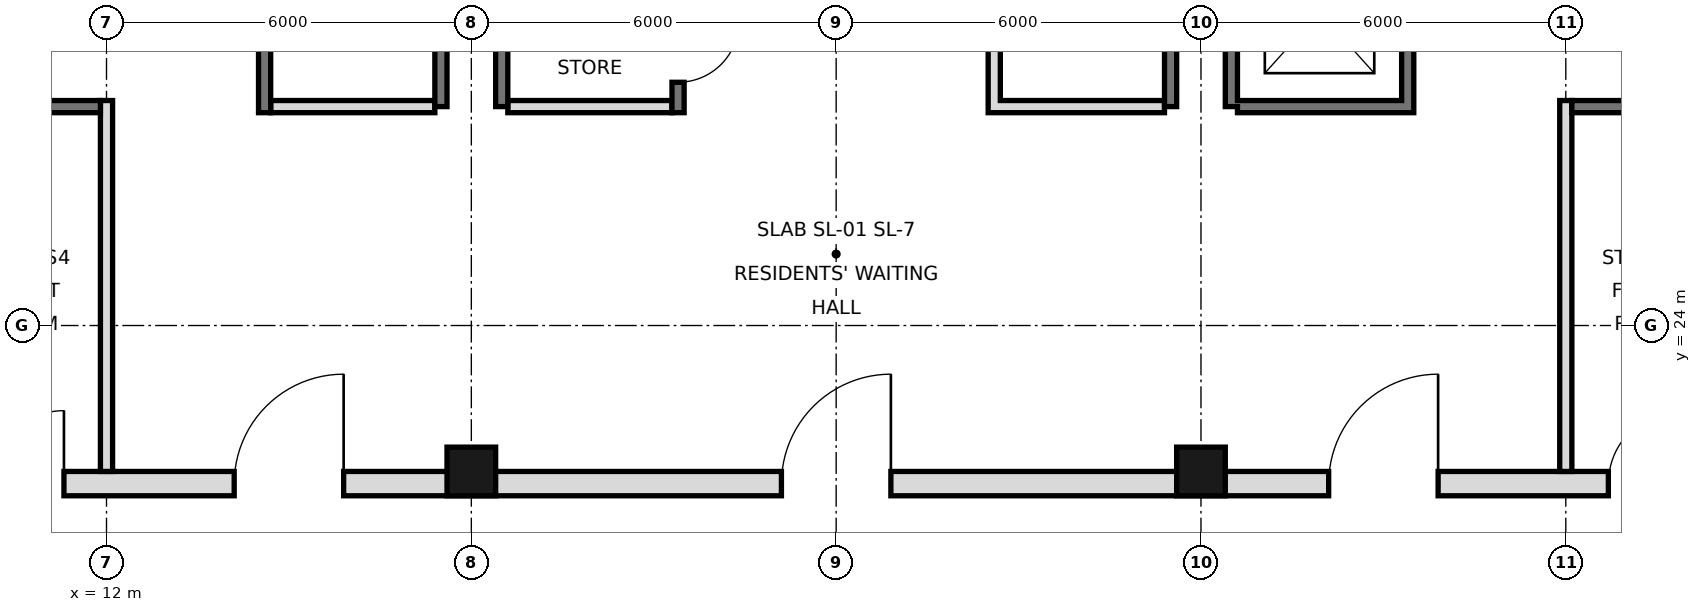
"""IFC4 building model, lengths in metres.
Left out: names, types, materials, properties, quantities, classifications, styles, units other than length and angle.
Written with IfcOpenShell. Run it as: python <this file> out.ifc"""

import sys

from ifc_helpers import new_model, si_unit, direction, frame, frame_2d, origin, origin_2d, place, context, subcontext, project, spatial, rectangle, hollow_rectangle, extrude, element, fill, save


model = new_model("IFC4")
c1 = context("Model", 3, precision=1e-05, world=origin(), true_north=direction((0.0, 1.0)))
c2 = subcontext(c1, "Body", "Model", "MODEL_VIEW")
j1 = project(units=[si_unit("LENGTHUNIT", "METRE"), si_unit("PLANEANGLEUNIT", "RADIAN")], contexts=[c1])
p1 = place(None, origin())
s1 = spatial("IfcSite", under=j1, at=p1, CompositionType="ELEMENT")
p2 = place(p1, origin())
s2 = spatial("IfcBuilding", under=s1, at=p2, CompositionType="ELEMENT")
p3 = place(p2, frame((0.0, 0.0, 254.0)))
s3 = spatial("IfcBuildingStorey", under=s2, at=p3, CompositionType="ELEMENT", Elevation=254.0)
for number, where, z_axis, x_axis in (
    (1, (18.0, 21.6, 0.0), (0.0, 0.0, 1.0), (1.0, 0.0, 0.0)),
    (2, (30.0, 21.6, 0.0), (0.0, 0.0, 1.0), (1.0, 0.0, 0.0)),
):
    element("IfcColumn", number, at=place(p3, frame(where, z_axis=z_axis, x_axis=x_axis)), inside=s3, PredefinedType="COLUMN", context=c2, shape_type="SweptSolid", body=[
        extrude(hollow_rectangle(XDim=0.8, YDim=0.8, WallThickness=0.032, at=origin_2d()), origin(), (0.0, 0.0, 1.0), 3.6),
    ])
for number, where, z_axis, x_axis in (
    (3, (17.5, 27.6, 0.0), (0.0, 0.0, 1.0), (0.0, 1.0, 0.0)),
    (4, (18.5, 27.6, 0.0), (0.0, 0.0, 1.0), (0.0, 1.0, 0.0)),
    (5, (29.5, 27.6, 0.0), (0.0, 0.0, 1.0), (0.0, 1.0, 0.0)),
    (6, (30.5, 27.6, 0.0), (0.0, 0.0, 1.0), (0.0, 1.0, 0.0)),
):
    element("IfcWall", number, at=place(p3, frame(where, z_axis=z_axis, x_axis=x_axis)), inside=s3, PredefinedType="SOLIDWALL", context=c2, shape_type="SweptSolid", body=[
        extrude(rectangle(XDim=17.5, YDim=0.2, at=frame_2d((8.75, 0.0))), origin(), (0.0, 0.0, 1.0), 3.38),
    ])
p4 = place(p3, frame((5.6, 21.4, 0.0), z_axis=(0.0, 0.0, 1.0), x_axis=(1.0, 0.0, 0.0)))
e7 = element("IfcWall", 7, at=p4, inside=s3, PredefinedType="SOLIDWALL", context=c2, shape_type="SweptSolid", body=[
    extrude(rectangle(XDim=36.8, YDim=0.4, at=frame_2d((18.4, 0.0))), origin(), (0.0, 0.0, 1.0), 3.38),
])
p5 = place(p4, frame((8.5, 0.0, 0.0)))
e8 = element("IfcOpeningElement", 8, at=p5, cuts=e7, PredefinedType="OPENING", context=c2, shape_type="SweptSolid", body=[
    extrude(rectangle(XDim=1.8, YDim=2.1, at=frame_2d((0.9, 1.05))), frame((0.0, 0.21, 0.0), z_axis=(0.0, -1.0, 0.0), x_axis=(1.0, 0.0, 0.0)), (0.0, 0.0, 1.0), 0.42),
])
p6 = place(p4, frame((17.5, 0.0, 0.0)))
e9 = element("IfcOpeningElement", 9, at=p6, cuts=e7, PredefinedType="OPENING", context=c2, shape_type="SweptSolid", body=[
    extrude(rectangle(XDim=1.8, YDim=2.1, at=frame_2d((0.9, 1.05))), frame((0.0, 0.21, 0.0), z_axis=(0.0, -1.0, 0.0), x_axis=(1.0, 0.0, 0.0)), (0.0, 0.0, 1.0), 0.42),
])
p7 = place(p4, frame((26.5, 0.0, 0.0)))
e10 = element("IfcOpeningElement", 10, at=p7, cuts=e7, PredefinedType="OPENING", context=c2, shape_type="SweptSolid", body=[
    extrude(rectangle(XDim=1.8, YDim=2.1, at=frame_2d((0.9, 1.05))), frame((0.0, 0.21, 0.0), z_axis=(0.0, -1.0, 0.0), x_axis=(1.0, 0.0, 0.0)), (0.0, 0.0, 1.0), 0.42),
])
p8 = place(p4, frame((4.5, 0.0, 0.0)))
e11 = element("IfcOpeningElement", 11, at=p8, cuts=e7, PredefinedType="OPENING", context=c2, shape_type="SweptSolid", body=[
    extrude(rectangle(XDim=1.2, YDim=2.1, at=frame_2d((0.6, 1.05))), frame((0.0, 0.21, 0.0), z_axis=(0.0, -1.0, 0.0), x_axis=(1.0, 0.0, 0.0)), (0.0, 0.0, 1.0), 0.42),
])
p9 = place(p4, frame((31.1, 0.0, 0.0)))
e12 = element("IfcOpeningElement", 12, at=p9, cuts=e7, PredefinedType="OPENING", context=c2, shape_type="SweptSolid", body=[
    extrude(rectangle(XDim=1.2, YDim=2.1, at=frame_2d((0.6, 1.05))), frame((0.0, 0.21, 0.0), z_axis=(0.0, -1.0, 0.0), x_axis=(1.0, 0.0, 0.0)), (0.0, 0.0, 1.0), 0.42),
])
p10 = place(p3, frame((12.0, 21.6, 0.0), z_axis=(0.0, 0.0, 1.0), x_axis=(0.0, 1.0, 0.0)))
e13 = element("IfcWall", 13, at=p10, inside=s3, PredefinedType="PARTITIONING", context=c2, shape_type="SweptSolid", body=[
    extrude(rectangle(XDim=6.1, YDim=0.2, at=frame_2d((3.05, 0.0))), origin(), (0.0, 0.0, 1.0), 3.38),
])
p11 = place(p3, frame((14.6, 27.5, 0.0), z_axis=(0.0, 0.0, 1.0), x_axis=(0.0, 1.0, 0.0)))
e14 = element("IfcWall", 14, at=p11, inside=s3, PredefinedType="SOLIDWALL", context=c2, shape_type="SweptSolid", body=[
    extrude(rectangle(XDim=17.5, YDim=0.2, at=frame_2d((8.75, 0.0))), origin(), (0.0, 0.0, 1.0), 3.38),
])
p12 = place(p11, frame((15.4, 0.0, 0.0)))
e15 = element("IfcOpeningElement", 15, at=p12, cuts=e14, PredefinedType="OPENING", context=c2, shape_type="SweptSolid", body=[
    extrude(rectangle(XDim=1.1, YDim=2.1, at=frame_2d((0.55, 1.05))), frame((0.0, 0.11, 0.0), z_axis=(0.0, -1.0, 0.0), x_axis=(1.0, 0.0, 0.0)), (0.0, 0.0, 1.0), 0.22),
])
p13 = place(p11, frame((2.7, 0.0, 0.0)))
e16 = element("IfcOpeningElement", 16, at=p13, cuts=e14, PredefinedType="OPENING", context=c2, shape_type="SweptSolid", body=[
    extrude(rectangle(XDim=1.0, YDim=2.1, at=frame_2d((0.5, 1.05))), frame((0.0, 0.11, 0.0), z_axis=(0.0, -1.0, 0.0), x_axis=(1.0, 0.0, 0.0)), (0.0, 0.0, 1.0), 0.22),
])
p14 = place(p11, frame((9.9, 0.0, 0.0)))
e17 = element("IfcOpeningElement", 17, at=p14, cuts=e14, PredefinedType="OPENING", context=c2, shape_type="SweptSolid", body=[
    extrude(rectangle(XDim=0.9, YDim=2.1, at=frame_2d((0.45, 1.05))), frame((0.0, 0.11, 0.0), z_axis=(0.0, -1.0, 0.0), x_axis=(1.0, 0.0, 0.0)), (0.0, 0.0, 1.0), 0.22),
])
p15 = place(p3, frame((21.4, 27.5, 0.0), z_axis=(0.0, 0.0, 1.0), x_axis=(0.0, 1.0, 0.0)))
e18 = element("IfcWall", 18, at=p15, inside=s3, PredefinedType="SOLIDWALL", context=c2, shape_type="SweptSolid", body=[
    extrude(rectangle(XDim=17.5, YDim=0.2, at=frame_2d((8.75, 0.0))), origin(), (0.0, 0.0, 1.0), 3.38),
])
p16 = place(p15, frame((0.5, 0.0, 0.0)))
e19 = element("IfcOpeningElement", 19, at=p16, cuts=e18, PredefinedType="OPENING", context=c2, shape_type="SweptSolid", body=[
    extrude(rectangle(XDim=1.0, YDim=2.1, at=frame_2d((0.5, 1.05))), frame((0.0, 0.11, 0.0), z_axis=(0.0, -1.0, 0.0), x_axis=(1.0, 0.0, 0.0)), (0.0, 0.0, 1.0), 0.22),
])
p17 = place(p15, frame((3.6, 0.0, 0.0)))
e20 = element("IfcOpeningElement", 20, at=p17, cuts=e18, PredefinedType="OPENING", context=c2, shape_type="SweptSolid", body=[
    extrude(rectangle(XDim=1.0, YDim=2.1, at=frame_2d((0.5, 1.05))), frame((0.0, 0.11, 0.0), z_axis=(0.0, -1.0, 0.0), x_axis=(1.0, 0.0, 0.0)), (0.0, 0.0, 1.0), 0.22),
])
p18 = place(p15, frame((9.8, 0.0, 0.0)))
e21 = element("IfcOpeningElement", 21, at=p18, cuts=e18, PredefinedType="OPENING", context=c2, shape_type="SweptSolid", body=[
    extrude(rectangle(XDim=1.0, YDim=2.1, at=frame_2d((0.5, 1.05))), frame((0.0, 0.11, 0.0), z_axis=(0.0, -1.0, 0.0), x_axis=(1.0, 0.0, 0.0)), (0.0, 0.0, 1.0), 0.22),
])
p19 = place(p15, frame((7.4, 0.0, 0.0)))
e22 = element("IfcOpeningElement", 22, at=p19, cuts=e18, PredefinedType="OPENING", context=c2, shape_type="SweptSolid", body=[
    extrude(rectangle(XDim=0.9, YDim=2.1, at=frame_2d((0.45, 1.05))), frame((0.0, 0.11, 0.0), z_axis=(0.0, -1.0, 0.0), x_axis=(1.0, 0.0, 0.0)), (0.0, 0.0, 1.0), 0.22),
])
p20 = place(p3, frame((26.6, 27.5, 0.0), z_axis=(0.0, 0.0, 1.0), x_axis=(0.0, 1.0, 0.0)))
e23 = element("IfcWall", 23, at=p20, inside=s3, PredefinedType="SOLIDWALL", context=c2, shape_type="SweptSolid", body=[
    extrude(rectangle(XDim=17.5, YDim=0.2, at=frame_2d((8.75, 0.0))), origin(), (0.0, 0.0, 1.0), 3.38),
])
p21 = place(p20, frame((4.3, 0.0, 0.0)))
e24 = element("IfcOpeningElement", 24, at=p21, cuts=e23, PredefinedType="OPENING", context=c2, shape_type="SweptSolid", body=[
    extrude(rectangle(XDim=0.9, YDim=2.1, at=frame_2d((0.45, 1.05))), frame((0.0, 0.11, 0.0), z_axis=(0.0, -1.0, 0.0), x_axis=(1.0, 0.0, 0.0)), (0.0, 0.0, 1.0), 0.22),
])
p22 = place(p20, frame((10.35, 0.0, 0.0)))
e25 = element("IfcOpeningElement", 25, at=p22, cuts=e23, PredefinedType="OPENING", context=c2, shape_type="SweptSolid", body=[
    extrude(rectangle(XDim=1.0, YDim=2.1, at=frame_2d((0.5, 1.05))), frame((0.0, 0.11, 0.0), z_axis=(0.0, -1.0, 0.0), x_axis=(1.0, 0.0, 0.0)), (0.0, 0.0, 1.0), 0.22),
])
p23 = place(p20, frame((14.575, 0.0, 0.0)))
e26 = element("IfcOpeningElement", 26, at=p23, cuts=e23, PredefinedType="OPENING", context=c2, shape_type="SweptSolid", body=[
    extrude(rectangle(XDim=1.0, YDim=2.1, at=frame_2d((0.5, 1.05))), frame((0.0, 0.11, 0.0), z_axis=(0.0, -1.0, 0.0), x_axis=(1.0, 0.0, 0.0)), (0.0, 0.0, 1.0), 0.22),
])
p24 = place(p3, frame((33.4, 27.5, 0.0), z_axis=(0.0, 0.0, 1.0), x_axis=(0.0, 1.0, 0.0)))
e27 = element("IfcWall", 27, at=p24, inside=s3, PredefinedType="SOLIDWALL", context=c2, shape_type="SweptSolid", body=[
    extrude(rectangle(XDim=17.5, YDim=0.2, at=frame_2d((8.75, 0.0))), origin(), (0.0, 0.0, 1.0), 3.38),
])
p25 = place(p24, frame((1.1, 0.0, 0.0)))
e28 = element("IfcOpeningElement", 28, at=p25, cuts=e27, PredefinedType="OPENING", context=c2, shape_type="SweptSolid", body=[
    extrude(rectangle(XDim=1.1, YDim=2.1, at=frame_2d((0.55, 1.05))), frame((0.0, 0.11, 0.0), z_axis=(0.0, -1.0, 0.0), x_axis=(1.0, 0.0, 0.0)), (0.0, 0.0, 1.0), 0.22),
])
p26 = place(p24, frame((4.2, 0.0, 0.0)))
e29 = element("IfcOpeningElement", 29, at=p26, cuts=e27, PredefinedType="OPENING", context=c2, shape_type="SweptSolid", body=[
    extrude(rectangle(XDim=1.1, YDim=2.1, at=frame_2d((0.55, 1.05))), frame((0.0, 0.11, 0.0), z_axis=(0.0, -1.0, 0.0), x_axis=(1.0, 0.0, 0.0)), (0.0, 0.0, 1.0), 0.22),
])
p27 = place(p24, frame((15.4, 0.0, 0.0)))
e30 = element("IfcOpeningElement", 30, at=p27, cuts=e27, PredefinedType="OPENING", context=c2, shape_type="SweptSolid", body=[
    extrude(rectangle(XDim=1.1, YDim=2.1, at=frame_2d((0.55, 1.05))), frame((0.0, 0.11, 0.0), z_axis=(0.0, -1.0, 0.0), x_axis=(1.0, 0.0, 0.0)), (0.0, 0.0, 1.0), 0.22),
])
p28 = place(p24, frame((9.9, 0.0, 0.0)))
e31 = element("IfcOpeningElement", 31, at=p28, cuts=e27, PredefinedType="OPENING", context=c2, shape_type="SweptSolid", body=[
    extrude(rectangle(XDim=0.9, YDim=2.1, at=frame_2d((0.45, 1.05))), frame((0.0, 0.11, 0.0), z_axis=(0.0, -1.0, 0.0), x_axis=(1.0, 0.0, 0.0)), (0.0, 0.0, 1.0), 0.22),
])
p29 = place(p3, frame((36.0, 21.6, 0.0), z_axis=(0.0, 0.0, 1.0), x_axis=(0.0, 1.0, 0.0)))
e32 = element("IfcWall", 32, at=p29, inside=s3, PredefinedType="PARTITIONING", context=c2, shape_type="SweptSolid", body=[
    extrude(rectangle(XDim=6.1, YDim=0.2, at=frame_2d((3.05, 0.0))), origin(), (0.0, 0.0, 1.0), 3.38),
])
for number, where, z_axis, x_axis in (
    (33, (14.7, 27.6, 0.0), (0.0, 0.0, 1.0), (1.0, 0.0, 0.0)),
    (34, (18.6, 27.6, 0.0), (0.0, 0.0, 1.0), (1.0, 0.0, 0.0)),
):
    element("IfcWall", number, at=place(p3, frame(where, z_axis=z_axis, x_axis=x_axis)), inside=s3, PredefinedType="PARTITIONING", context=c2, shape_type="SweptSolid", body=[
        extrude(rectangle(XDim=2.7, YDim=0.2, at=frame_2d((1.35, 0.0))), origin(), (0.0, 0.0, 1.0), 3.38),
    ])
for number, where, z_axis, x_axis in (
    (35, (26.7, 27.6, 0.0), (0.0, 0.0, 1.0), (1.0, 0.0, 0.0)),
    (36, (30.6, 27.6, 0.0), (0.0, 0.0, 1.0), (1.0, 0.0, 0.0)),
):
    element("IfcWall", number, at=place(p3, frame(where, z_axis=z_axis, x_axis=x_axis)), inside=s3, PredefinedType="SOLIDWALL", context=c2, shape_type="SweptSolid", body=[
        extrude(rectangle(XDim=2.7, YDim=0.2, at=frame_2d((1.35, 0.0))), origin(), (0.0, 0.0, 1.0), 3.38),
    ])
for number, where, z_axis, x_axis in (
    (37, (36.1, 27.6, 0.0), (0.0, 0.0, 1.0), (1.0, 0.0, 0.0)),
    (38, (6.6, 27.6, 0.0), (0.0, 0.0, 1.0), (1.0, 0.0, 0.0)),
):
    element("IfcWall", number, at=place(p3, frame(where, z_axis=z_axis, x_axis=x_axis)), inside=s3, PredefinedType="SOLIDWALL", context=c2, shape_type="SweptSolid", body=[
        extrude(rectangle(XDim=5.3, YDim=0.2, at=frame_2d((2.65, 0.0))), origin(), (0.0, 0.0, 1.0), 3.38),
    ])
p30 = place(p5, frame((1.8, 0.0, 0.0), z_axis=(0.0, 0.0, 1.0), x_axis=(-1.0, 0.0, 0.0)))
e39 = element("IfcDoor", 39, at=p30, inside=s3, OperationType="SINGLE_SWING_LEFT", PredefinedType="DOOR", context=c2, shape_type="SweptSolid", body=[
    extrude(rectangle(XDim=1.8, YDim=2.1, at=frame_2d((0.9, 1.05))), frame((0.0, 0.025, 0.0), z_axis=(0.0, -1.0, 0.0), x_axis=(1.0, 0.0, 0.0)), (0.0, 0.0, 1.0), 0.05),
])
fill(e8, e39)
p31 = place(p6, frame((1.8, 0.0, 0.0), z_axis=(0.0, 0.0, 1.0), x_axis=(-1.0, 0.0, 0.0)))
e40 = element("IfcDoor", 40, at=p31, inside=s3, OperationType="SINGLE_SWING_LEFT", PredefinedType="DOOR", context=c2, shape_type="SweptSolid", body=[
    extrude(rectangle(XDim=1.8, YDim=2.1, at=frame_2d((0.9, 1.05))), frame((0.0, 0.025, 0.0), z_axis=(0.0, -1.0, 0.0), x_axis=(1.0, 0.0, 0.0)), (0.0, 0.0, 1.0), 0.05),
])
fill(e9, e40)
p32 = place(p7, frame((1.8, 0.0, 0.0), z_axis=(0.0, 0.0, 1.0), x_axis=(-1.0, 0.0, 0.0)))
e41 = element("IfcDoor", 41, at=p32, inside=s3, OperationType="SINGLE_SWING_LEFT", PredefinedType="DOOR", context=c2, shape_type="SweptSolid", body=[
    extrude(rectangle(XDim=1.8, YDim=2.1, at=frame_2d((0.9, 1.05))), frame((0.0, 0.025, 0.0), z_axis=(0.0, -1.0, 0.0), x_axis=(1.0, 0.0, 0.0)), (0.0, 0.0, 1.0), 0.05),
])
fill(e10, e41)
p33 = place(p8, frame((1.2, 0.0, 0.0), z_axis=(0.0, 0.0, 1.0), x_axis=(-1.0, 0.0, 0.0)))
e42 = element("IfcDoor", 42, at=p33, inside=s3, OperationType="SINGLE_SWING_LEFT", PredefinedType="DOOR", context=c2, shape_type="SweptSolid", body=[
    extrude(rectangle(XDim=1.2, YDim=2.1, at=frame_2d((0.6, 1.05))), frame((0.0, 0.025, 0.0), z_axis=(0.0, -1.0, 0.0), x_axis=(1.0, 0.0, 0.0)), (0.0, 0.0, 1.0), 0.05),
])
fill(e11, e42)
p34 = place(p9, frame((1.2, 0.0, 0.0), z_axis=(0.0, 0.0, 1.0), x_axis=(-1.0, 0.0, 0.0)))
e43 = element("IfcDoor", 43, at=p34, inside=s3, OperationType="SINGLE_SWING_LEFT", PredefinedType="DOOR", context=c2, shape_type="SweptSolid", body=[
    extrude(rectangle(XDim=1.2, YDim=2.1, at=frame_2d((0.6, 1.05))), frame((0.0, 0.025, 0.0), z_axis=(0.0, -1.0, 0.0), x_axis=(1.0, 0.0, 0.0)), (0.0, 0.0, 1.0), 0.05),
])
fill(e12, e43)
p35 = place(p16, origin())
e44 = element("IfcDoor", 44, at=p35, inside=s3, OperationType="SINGLE_SWING_RIGHT", PredefinedType="DOOR", context=c2, shape_type="SweptSolid", body=[
    extrude(rectangle(XDim=1.0, YDim=2.1, at=frame_2d((0.5, 1.05))), frame((0.0, 0.025, 0.0), z_axis=(0.0, -1.0, 0.0), x_axis=(1.0, 0.0, 0.0)), (0.0, 0.0, 1.0), 0.05),
])
fill(e19, e44)
save(model, sys.argv[1])
